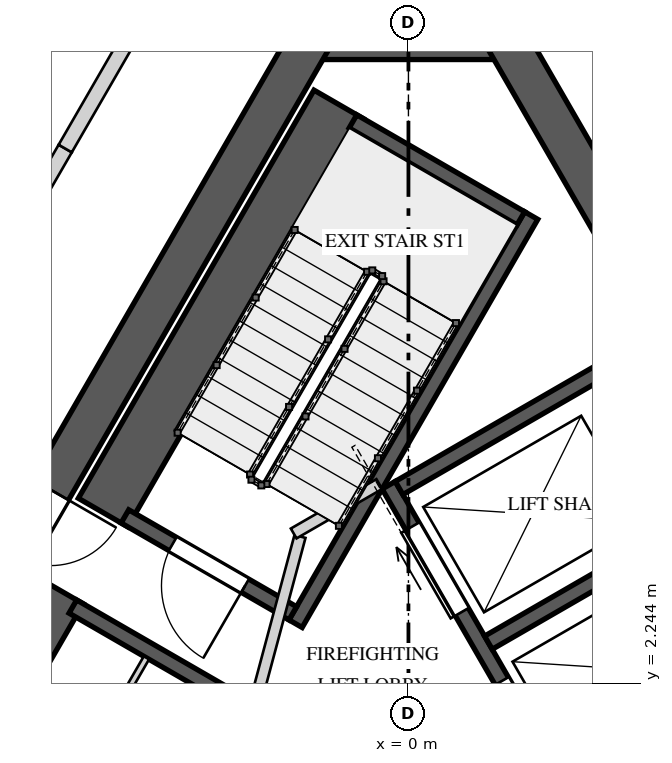
"""IFC4 building model, lengths in metres.
Left out: names, types, materials, properties, quantities, classifications, styles, units other than length and angle.
Written with IfcOpenShell. Run it as: python <this file> out.ifc"""

import sys

from ifc_helpers import new_model, si_unit, direction, frame, frame_2d, origin, place, context, subcontext, project, spatial, rectangle, extrude, element, fill, save


model = new_model("IFC4")
c1 = context("Model", 3, precision=1e-05, world=origin(), true_north=direction((0.0, 1.0)))
c2 = subcontext(c1, "Body", "Model", "MODEL_VIEW")
j1 = project(units=[si_unit("LENGTHUNIT", "METRE"), si_unit("PLANEANGLEUNIT", "RADIAN")], contexts=[c1])
p1 = place(None, origin())
s1 = spatial("IfcSite", under=j1, at=p1, CompositionType="ELEMENT")
p2 = place(p1, origin())
s2 = spatial("IfcBuilding", under=s1, at=p2, CompositionType="ELEMENT")
p3 = place(p2, frame((0.0, 0.0, 344.4)))
s3 = spatial("IfcBuildingStorey", under=s2, at=p3, CompositionType="ELEMENT", Elevation=344.4)
p4 = place(p3, frame((1.443, 10.725, 0.0), z_axis=(0.0, 0.0, 1.0), x_axis=(-1.0, 0.0, 0.0)))
e1 = element("IfcWall", 1, at=p4, inside=s3, PredefinedType="SHEAR", context=c2, shape_type="SweptSolid", body=[
    extrude(rectangle(XDim=2.887, YDim=0.55, at=frame_2d((1.443, 0.0))), origin(), (0.0, 0.0, 1.0), 4.0),
])
p5 = place(p3, frame((-1.285, 10.725, 0.0), z_axis=(0.0, 0.0, 1.0), x_axis=(-0.499994590896, -0.86602852671, 0.0)))
e2 = element("IfcWall", 2, at=p5, inside=s3, PredefinedType="SHEAR", context=c2, shape_type="SweptSolid", body=[
    extrude(rectangle(XDim=17.292, YDim=0.55, at=frame_2d((8.646, 0.0))), origin(), (0.0, 0.0, 1.0), 4.0),
])
p6 = place(p5, frame((6.851, 0.0, 0.0)))
e3 = element("IfcOpeningElement", 3, at=p6, cuts=e2, PredefinedType="OPENING", context=c2, shape_type="SweptSolid", body=[
    extrude(rectangle(XDim=1.0, YDim=2.4, at=frame_2d((0.5, 1.2))), frame((0.0, 0.285, 0.0), z_axis=(0.0, -1.0, 0.0), x_axis=(1.0, 0.0, 0.0)), (0.0, 0.0, 1.0), 0.57),
])
p7 = place(p5, frame((15.089, 0.0, 0.0)))
e4 = element("IfcOpeningElement", 4, at=p7, cuts=e2, PredefinedType="OPENING", context=c2, shape_type="SweptSolid", body=[
    extrude(rectangle(XDim=0.8, YDim=2.1, at=frame_2d((0.4, 1.05))), frame((0.0, 0.285, 0.0), z_axis=(0.0, -1.0, 0.0), x_axis=(1.0, 0.0, 0.0)), (0.0, 0.0, 1.0), 0.57),
])
p8 = place(p3, frame((9.93, -4.25, 0.0), z_axis=(0.0, 0.0, 1.0), x_axis=(-0.499994590896, 0.86602852671, 0.0)))
e5 = element("IfcWall", 5, at=p8, inside=s3, PredefinedType="SHEAR", context=c2, shape_type="SweptSolid", body=[
    extrude(rectangle(XDim=17.292, YDim=0.55, at=frame_2d((8.646, 0.0))), origin(), (0.0, 0.0, 1.0), 4.0),
])
p9 = place(p8, frame((6.921, 0.0, 0.0)))
e6 = element("IfcOpeningElement", 6, at=p9, cuts=e5, PredefinedType="OPENING", context=c2, shape_type="SweptSolid", body=[
    extrude(rectangle(XDim=1.0, YDim=2.4, at=frame_2d((0.5, 1.2))), frame((0.0, 0.285, 0.0), z_axis=(0.0, -1.0, 0.0), x_axis=(1.0, 0.0, 0.0)), (0.0, 0.0, 1.0), 0.57),
])
p10 = place(p3, frame((-0.918, 9.86, 0.0), z_axis=(0.0, 0.0, 1.0), x_axis=(-0.500026960575, -0.86600983753, 0.0)))
e7 = element("IfcWall", 7, at=p10, inside=s3, PredefinedType="SOLIDWALL", context=c2, shape_type="SweptSolid", body=[
    extrude(rectangle(XDim=6.2, YDim=0.75, at=frame_2d((3.1, 0.0))), origin(), (0.0, 0.0, 1.0), 3.65),
])
p11 = place(p3, frame((1.615, 8.397, 0.0), z_axis=(0.0, 0.0, 1.0), x_axis=(-0.500009909098, -0.866019682689, 0.0)))
e8 = element("IfcWall", 8, at=p11, inside=s3, PredefinedType="SOLIDWALL", context=c2, shape_type="SweptSolid", body=[
    extrude(rectangle(XDim=6.2, YDim=0.2, at=frame_2d((3.1, 0.0))), origin(), (0.0, 0.0, 1.0), 3.65),
])
p12 = place(p3, frame((1.479, 8.361, 0.0), z_axis=(0.0, 0.0, 1.0), x_axis=(-0.865989465428, 0.500062241894, 0.0)))
e9 = element("IfcWall", 9, at=p12, inside=s3, PredefinedType="SOLIDWALL", context=c2, shape_type="SweptSolid", body=[
    extrude(rectangle(XDim=2.55, YDim=0.2, at=frame_2d((1.275, 0.0))), origin(), (0.0, 0.0, 1.0), 3.65),
])
p13 = place(p3, frame((-1.521, 3.165, 0.0), z_axis=(0.0, 0.0, 1.0), x_axis=(-0.866030925526, 0.499990435942, 0.0)))
e10 = element("IfcWall", 10, at=p13, inside=s3, PredefinedType="SOLIDWALL", context=c2, shape_type="SweptSolid", body=[
    extrude(rectangle(XDim=2.55, YDim=0.2, at=frame_2d((1.275, 0.0))), origin(), (0.0, 0.0, 1.0), 3.65),
])
p14 = place(p13, frame((0.725, 0.0, 0.0)))
e11 = element("IfcOpeningElement", 11, at=p14, cuts=e10, PredefinedType="OPENING", context=c2, shape_type="SweptSolid", body=[
    extrude(rectangle(XDim=1.1, YDim=2.4, at=frame_2d((0.55, 1.2))), frame((0.0, 0.11, 0.0), z_axis=(0.0, -1.0, 0.0), x_axis=(1.0, 0.0, 0.0)), (0.0, 0.0, 1.0), 0.22),
])
p15 = place(p3, frame((-4.603, 3.477, 0.0), z_axis=(0.0, 0.0, 1.0), x_axis=(-0.500015767406, -0.866016300277, 0.0)))
e12 = element("IfcWall", 12, at=p15, inside=s3, PredefinedType="SOLIDWALL", context=c2, shape_type="SweptSolid", body=[
    extrude(rectangle(XDim=5.5, YDim=0.75, at=frame_2d((2.75, 0.0))), origin(), (0.0, 0.0, 1.0), 3.65),
])
p16 = place(p3, frame((-2.38, 2.078, 0.0), z_axis=(0.0, 0.0, 1.0), x_axis=(-0.866061024631, 0.499938297808, 0.0)))
e13 = element("IfcWall", 13, at=p16, inside=s3, PredefinedType="SOLIDWALL", context=c2, shape_type="SweptSolid", body=[
    extrude(rectangle(XDim=2.35, YDim=0.2, at=frame_2d((1.175, 0.0))), origin(), (0.0, 0.0, 1.0), 3.65),
])
p17 = place(p3, frame((-5.997, -1.838, 0.0), z_axis=(0.0, 0.0, 1.0), x_axis=(0.500005610874, 0.86602216432, 0.0)))
e14 = element("IfcWall", 14, at=p17, inside=s3, PredefinedType="PARTITIONING", context=c2, shape_type="SweptSolid", body=[
    extrude(rectangle(XDim=5.1, YDim=0.08, at=frame_2d((2.55, 0.0))), origin(), (0.0, 0.0, 1.0), 3.65),
])
p18 = place(p17, frame((1.25, 0.0, 0.0)))
e15 = element("IfcOpeningElement", 15, at=p18, cuts=e14, PredefinedType="OPENING", context=c2, shape_type="SweptSolid", body=[
    extrude(rectangle(XDim=0.8, YDim=2.1, at=frame_2d((0.4, 1.05))), frame((0.0, 0.05, 0.0), z_axis=(0.0, -1.0, 0.0), x_axis=(1.0, 0.0, 0.0)), (0.0, 0.0, 1.0), 0.1),
])
p19 = place(p3, frame((2.19, 0.606, 0.0), z_axis=(0.0, 0.0, 1.0), x_axis=(-0.500002801628, 0.866023786258, 0.0)))
e16 = element("IfcWall", 16, at=p19, inside=s3, PredefinedType="SOLIDWALL", context=c2, shape_type="SweptSolid", body=[
    extrude(rectangle(XDim=4.9, YDim=0.2, at=frame_2d((2.45, 0.0))), origin(), (0.0, 0.0, 1.0), 3.65),
])
p20 = place(p19, frame((0.625, 0.0, 0.0)))
e17 = element("IfcOpeningElement", 17, at=p20, cuts=e16, PredefinedType="OPENING", context=c2, shape_type="SweptSolid", body=[
    extrude(rectangle(XDim=1.3, YDim=2.1, at=frame_2d((0.65, 1.05))), frame((0.0, 0.11, 0.0), z_axis=(0.0, -1.0, 0.0), x_axis=(1.0, 0.0, 0.0)), (0.0, 0.0, 1.0), 0.22),
])
p21 = place(p19, frame((2.975, 0.0, 0.0)))
e18 = element("IfcOpeningElement", 18, at=p21, cuts=e16, PredefinedType="OPENING", context=c2, shape_type="SweptSolid", body=[
    extrude(rectangle(XDim=1.3, YDim=2.1, at=frame_2d((0.65, 1.05))), frame((0.0, 0.11, 0.0), z_axis=(0.0, -1.0, 0.0), x_axis=(1.0, 0.0, 0.0)), (0.0, 0.0, 1.0), 0.22),
])
for number, where, z_axis, x_axis in (
    (19, (2.227, 0.743, 0.0), (0.0, 0.0, 1.0), (0.866, 0.5, 0.0)),
    (20, (1.052, 2.778, 0.0), (0.0, 0.0, 1.0), (0.866, 0.5, 0.0)),
    (21, (-0.123, 4.813, 0.0), (0.0, 0.0, 1.0), (0.866, 0.5, 0.0)),
):
    element("IfcWall", number, at=place(p3, frame(where, z_axis=z_axis, x_axis=x_axis)), inside=s3, PredefinedType="SOLIDWALL", context=c2, shape_type="SweptSolid", body=[
        extrude(rectangle(XDim=3.15, YDim=0.2, at=frame_2d((1.575, 0.0))), origin(), (0.0, 0.0, 1.0), 3.65),
    ])
p22 = place(p3, frame((-2.178, 1.372, 0.0), z_axis=(0.0, 0.0, 1.0), x_axis=(0.258808958833, 0.96592852884, 0.0)))
e22 = element("IfcWall", 22, at=p22, inside=s3, PredefinedType="PARTITIONING", context=c2, shape_type="SweptSolid", body=[
    extrude(rectangle(XDim=2.903, YDim=0.15, at=frame_2d((1.451, 0.0))), origin(), (0.0, 0.0, 1.0), 3.65),
])
p23 = place(p3, frame((-1.51, 4.215, 0.0), z_axis=(0.0, 0.0, 1.0), x_axis=(0.866085525409, 0.49989585183, 0.0)))
e23 = element("IfcWall", 23, at=p23, inside=s3, PredefinedType="PARTITIONING", context=c2, shape_type="SweptSolid", body=[
    extrude(rectangle(XDim=1.3, YDim=0.15, at=frame_2d((0.65, 0.0))), origin(), (0.0, 0.0, 1.0), 3.65),
])
p24 = place(p3, frame((-4.929, 8.563, 0.0), z_axis=(0.0, 0.0, 1.0), x_axis=(0.500046299512, 0.865998671098, 0.0)))
e24 = element("IfcWall", 24, at=p24, inside=s3, PredefinedType="SOLIDWALL", context=c2, shape_type="SweptSolid", body=[
    extrude(rectangle(XDim=0.827, YDim=0.2, at=frame_2d((0.413, 0.0))), origin(), (0.0, 0.0, 1.0), 2.95),
])
p25 = place(p3, frame((-4.515, 9.279, 0.0), z_axis=(0.0, 0.0, 1.0), x_axis=(0.499975428181, 0.866039589866, 0.0)))
e25 = element("IfcWall", 25, at=p25, inside=s3, PredefinedType="SOLIDWALL", context=c2, shape_type="SweptSolid", body=[
    extrude(rectangle(XDim=4.066, YDim=0.2, at=frame_2d((2.033, 0.0))), origin(), (0.0, 0.0, 1.0), 3.65),
])
p26 = place(p3, frame((2.483, 12.8, 0.0), z_axis=(0.0, 0.0, 1.0), x_axis=(0.499982771656, -0.866035350345, 0.0)))
e26 = element("IfcWall", 26, at=p26, inside=s3, PredefinedType="SOLIDWALL", context=c2, shape_type="SweptSolid", body=[
    extrude(rectangle(XDim=4.195, YDim=0.2, at=frame_2d((2.097, 0.0))), origin(), (0.0, 0.0, 1.0), 3.65),
])
p27 = place(p14, origin())
e27 = element("IfcDoor", 27, at=p27, inside=s3, OperationType="SINGLE_SWING_RIGHT", PredefinedType="DOOR", context=c2, shape_type="SweptSolid", body=[
    extrude(rectangle(XDim=1.1, YDim=2.4, at=frame_2d((0.55, 1.2))), frame((0.0, 0.025, 0.0), z_axis=(0.0, -1.0, 0.0), x_axis=(1.0, 0.0, 0.0)), (0.0, 0.0, 1.0), 0.05),
])
fill(e11, e27)
p28 = place(p20, origin())
e28 = element("IfcDoor", 28, at=p28, inside=s3, OperationType="SLIDING_TO_LEFT", PredefinedType="DOOR", context=c2, shape_type="SweptSolid", body=[
    extrude(rectangle(XDim=1.3, YDim=2.1, at=frame_2d((0.65, 1.05))), frame((0.0, 0.025, 0.0), z_axis=(0.0, -1.0, 0.0), x_axis=(1.0, 0.0, 0.0)), (0.0, 0.0, 1.0), 0.05),
])
fill(e17, e28)
p29 = place(p21, origin())
e29 = element("IfcDoor", 29, at=p29, inside=s3, OperationType="SLIDING_TO_RIGHT", PredefinedType="DOOR", context=c2, shape_type="SweptSolid", body=[
    extrude(rectangle(XDim=1.3, YDim=2.1, at=frame_2d((0.65, 1.05))), frame((0.0, 0.025, 0.0), z_axis=(0.0, -1.0, 0.0), x_axis=(1.0, 0.0, 0.0)), (0.0, 0.0, 1.0), 0.05),
])
fill(e18, e29)
save(model, sys.argv[1])
